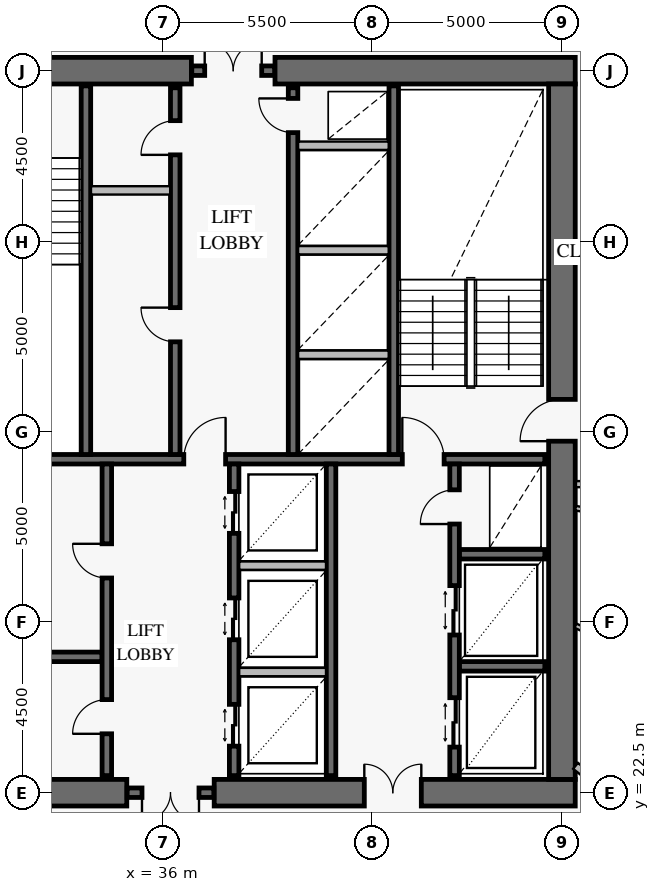
"""IFC4 building model, lengths in metres.
Left out: names, types, materials, properties, quantities, classifications, styles, units other than length and angle.
Written with IfcOpenShell. Run it as: python <this file> out.ifc"""

import sys

from ifc_helpers import new_model, si_unit, direction, frame, frame_2d, origin, place, context, subcontext, project, spatial, rectangle, extrude, element, fill, save


model = new_model("IFC4")
c1 = context("Model", 3, precision=1e-05, world=origin(), true_north=direction((0.0, 1.0)))
c2 = subcontext(c1, "Body", "Model", "MODEL_VIEW")
j1 = project(units=[si_unit("LENGTHUNIT", "METRE"), si_unit("PLANEANGLEUNIT", "RADIAN")], contexts=[c1])
p1 = place(None, origin())
s1 = spatial("IfcSite", under=j1, at=p1, CompositionType="ELEMENT")
p2 = place(p1, origin())
s2 = spatial("IfcBuilding", under=s1, at=p2, CompositionType="ELEMENT")
p3 = place(p2, frame((0.0, 0.0, 173.2)))
s3 = spatial("IfcBuildingStorey", under=s2, at=p3, CompositionType="ELEMENT", Elevation=173.2)
p4 = place(p3, frame((25.15, 22.5, 0.0), z_axis=(0.0, 0.0, 1.0), x_axis=(1.0, 0.0, 0.0)))
e1 = element("IfcWall", 1, at=p4, inside=s3, PredefinedType="SHEAR", context=c2, shape_type="SweptSolid", body=[
    extrude(rectangle(XDim=9.9, YDim=0.7, at=frame_2d((4.95, 0.0))), origin(), (0.0, 0.0, 1.0), 3.8),
])
p5 = place(p4, frame((4.25, 0.0, 0.0)))
e2 = element("IfcOpeningElement", 2, at=p5, cuts=e1, PredefinedType="OPENING", context=c2, shape_type="SweptSolid", body=[
    extrude(rectangle(XDim=1.5, YDim=2.15, at=frame_2d((0.75, 1.075))), frame((0.0, 0.362, 0.0), z_axis=(0.0, -1.0, 0.0), x_axis=(1.0, 0.0, 0.0)), (0.0, 0.0, 1.0), 0.724),
])
p6 = place(p3, frame((37.35, 22.5, 0.0), z_axis=(0.0, 0.0, 1.0), x_axis=(1.0, 0.0, 0.0)))
e3 = element("IfcWall", 3, at=p6, inside=s3, PredefinedType="SHEAR", context=c2, shape_type="SweptSolid", body=[
    extrude(rectangle(XDim=9.5, YDim=0.7, at=frame_2d((4.75, 0.0))), origin(), (0.0, 0.0, 1.0), 3.8),
])
p7 = place(p6, frame((3.95, 0.0, 0.0)))
e4 = element("IfcOpeningElement", 4, at=p7, cuts=e3, PredefinedType="OPENING", context=c2, shape_type="SweptSolid", body=[
    extrude(rectangle(XDim=1.5, YDim=2.15, at=frame_2d((0.75, 1.075))), frame((0.0, 0.362, 0.0), z_axis=(0.0, -1.0, 0.0), x_axis=(1.0, 0.0, 0.0)), (0.0, 0.0, 1.0), 0.724),
])
p8 = place(p3, frame((46.85, 41.5, 0.0), z_axis=(0.0, 0.0, 1.0), x_axis=(-1.0, 0.0, 0.0)))
e5 = element("IfcWall", 5, at=p8, inside=s3, PredefinedType="SHEAR", context=c2, shape_type="SweptSolid", body=[
    extrude(rectangle(XDim=7.9, YDim=0.7, at=frame_2d((3.95, 0.0))), origin(), (0.0, 0.0, 1.0), 3.8),
])
p9 = place(p3, frame((36.75, 41.5, 0.0), z_axis=(0.0, 0.0, 1.0), x_axis=(-1.0, 0.0, 0.0)))
e6 = element("IfcWall", 6, at=p9, inside=s3, PredefinedType="SHEAR", context=c2, shape_type="SweptSolid", body=[
    extrude(rectangle(XDim=11.6, YDim=0.7, at=frame_2d((5.8, 0.0))), origin(), (0.0, 0.0, 1.0), 3.8),
])
p10 = place(p9, frame((4.25, 0.0, 0.0)))
e7 = element("IfcOpeningElement", 7, at=p10, cuts=e6, PredefinedType="OPENING", context=c2, shape_type="SweptSolid", body=[
    extrude(rectangle(XDim=1.1, YDim=2.15, at=frame_2d((0.55, 1.075))), frame((0.0, 0.362, 0.0), z_axis=(0.0, -1.0, 0.0), x_axis=(1.0, 0.0, 0.0)), (0.0, 0.0, 1.0), 0.724),
])
p11 = place(p3, frame((46.5, 22.85, 0.0), z_axis=(0.0, 0.0, 1.0), x_axis=(0.0, 1.0, 0.0)))
e8 = element("IfcWall", 8, at=p11, inside=s3, PredefinedType="SHEAR", context=c2, shape_type="SweptSolid", body=[
    extrude(rectangle(XDim=18.3, YDim=0.7, at=frame_2d((9.15, 0.0))), origin(), (0.0, 0.0, 1.0), 3.8),
])
p12 = place(p11, frame((8.9, 0.0, 0.0)))
e9 = element("IfcOpeningElement", 9, at=p12, cuts=e8, PredefinedType="OPENING", context=c2, shape_type="SweptSolid", body=[
    extrude(rectangle(XDim=1.1, YDim=2.15, at=frame_2d((0.55, 1.075))), frame((0.0, 0.362, 0.0), z_axis=(0.0, -1.0, 0.0), x_axis=(1.0, 0.0, 0.0)), (0.0, 0.0, 1.0), 0.724),
])
p13 = place(p3, frame((35.06, 22.5, 0.0), z_axis=(0.0, 0.0, 1.0), x_axis=(1.0, 0.0, 0.0)))
e10 = element("IfcWall", 10, at=p13, inside=s3, PredefinedType="SOLIDWALL", context=c2, shape_type="SweptSolid", body=[
    extrude(rectangle(XDim=2.28, YDim=0.25, at=frame_2d((1.14, 0.0))), origin(), (0.0, 0.0, 1.0), 3.8),
])
p14 = place(p13, frame((0.39, 0.0, 0.0)))
e11 = element("IfcOpeningElement", 11, at=p14, cuts=e10, PredefinedType="OPENING", context=c2, shape_type="SweptSolid", body=[
    extrude(rectangle(XDim=1.5, YDim=2.15, at=frame_2d((0.75, 1.075))), frame((0.0, 0.137, 0.0), z_axis=(0.0, -1.0, 0.0), x_axis=(1.0, 0.0, 0.0)), (0.0, 0.0, 1.0), 0.274),
])
p15 = place(p3, frame((36.76, 41.5, 0.0), z_axis=(0.0, 0.0, 1.0), x_axis=(1.0, 0.0, 0.0)))
e12 = element("IfcWall", 12, at=p15, inside=s3, PredefinedType="SOLIDWALL", context=c2, shape_type="SweptSolid", body=[
    extrude(rectangle(XDim=2.18, YDim=0.25, at=frame_2d((1.09, 0.0))), origin(), (0.0, 0.0, 1.0), 3.8),
])
p16 = place(p15, frame((0.34, 0.0, 0.0)))
e13 = element("IfcOpeningElement", 13, at=p16, cuts=e12, PredefinedType="OPENING", context=c2, shape_type="SweptSolid", body=[
    extrude(rectangle(XDim=1.5, YDim=2.15, at=frame_2d((0.75, 1.075))), frame((0.0, 0.137, 0.0), z_axis=(0.0, -1.0, 0.0), x_axis=(1.0, 0.0, 0.0)), (0.0, 0.0, 1.0), 0.274),
])
p17 = place(p3, frame((25.95, 31.275, 0.0), z_axis=(0.0, 0.0, 1.0), x_axis=(1.0, 0.0, 0.0)))
e14 = element("IfcWall", 14, at=p17, inside=s3, PredefinedType="SOLIDWALL", context=c2, shape_type="SweptSolid", body=[
    extrude(rectangle(XDim=20.1, YDim=0.25, at=frame_2d((10.05, 0.0))), origin(), (0.0, 0.0, 1.0), 3.8),
])
p18 = place(p17, frame((2.6, 0.0, 0.0)))
e15 = element("IfcOpeningElement", 15, at=p18, cuts=e14, PredefinedType="OPENING", context=c2, shape_type="SweptSolid", body=[
    extrude(rectangle(XDim=1.1, YDim=2.15, at=frame_2d((0.55, 1.075))), frame((0.0, 0.137, 0.0), z_axis=(0.0, -1.0, 0.0), x_axis=(1.0, 0.0, 0.0)), (0.0, 0.0, 1.0), 0.274),
])
p19 = place(p17, frame((10.6, 0.0, 0.0)))
e16 = element("IfcOpeningElement", 16, at=p19, cuts=e14, PredefinedType="OPENING", context=c2, shape_type="SweptSolid", body=[
    extrude(rectangle(XDim=1.1, YDim=2.15, at=frame_2d((0.55, 1.075))), frame((0.0, 0.137, 0.0), z_axis=(0.0, -1.0, 0.0), x_axis=(1.0, 0.0, 0.0)), (0.0, 0.0, 1.0), 0.274),
])
p20 = place(p17, frame((16.35, 0.0, 0.0)))
e17 = element("IfcOpeningElement", 17, at=p20, cuts=e14, PredefinedType="OPENING", context=c2, shape_type="SweptSolid", body=[
    extrude(rectangle(XDim=1.1, YDim=2.15, at=frame_2d((0.55, 1.075))), frame((0.0, 0.137, 0.0), z_axis=(0.0, -1.0, 0.0), x_axis=(1.0, 0.0, 0.0)), (0.0, 0.0, 1.0), 0.274),
])
for number, where, z_axis, x_axis in (
    (18, (33.975, 31.4, 0.0), (0.0, 0.0, 1.0), (0.0, 1.0, 0.0)),
    (19, (42.075, 31.4, 0.0), (0.0, 0.0, 1.0), (0.0, 1.0, 0.0)),
):
    element("IfcWall", number, at=place(p3, frame(where, z_axis=z_axis, x_axis=x_axis)), inside=s3, PredefinedType="SOLIDWALL", context=c2, shape_type="SweptSolid", body=[
        extrude(rectangle(XDim=9.7, YDim=0.25, at=frame_2d((4.85, 0.0))), origin(), (0.0, 0.0, 1.0), 3.8),
    ])
p21 = place(p3, frame((36.325, 31.4, 0.0), z_axis=(0.0, 0.0, 1.0), x_axis=(0.0, 1.0, 0.0)))
e20 = element("IfcWall", 20, at=p21, inside=s3, PredefinedType="SOLIDWALL", context=c2, shape_type="SweptSolid", body=[
    extrude(rectangle(XDim=9.65, YDim=0.25, at=frame_2d((4.825, 0.0))), origin(), (0.0, 0.0, 1.0), 3.8),
])
p22 = place(p21, frame((2.965, 0.0, 0.0)))
e21 = element("IfcOpeningElement", 21, at=p22, cuts=e20, PredefinedType="OPENING", context=c2, shape_type="SweptSolid", body=[
    extrude(rectangle(XDim=0.9, YDim=2.1, at=frame_2d((0.45, 1.05))), frame((0.0, 0.137, 0.0), z_axis=(0.0, -1.0, 0.0), x_axis=(1.0, 0.0, 0.0)), (0.0, 0.0, 1.0), 0.274),
])
p23 = place(p21, frame((7.885, 0.0, 0.0)))
e22 = element("IfcOpeningElement", 22, at=p23, cuts=e20, PredefinedType="OPENING", context=c2, shape_type="SweptSolid", body=[
    extrude(rectangle(XDim=0.9, YDim=2.1, at=frame_2d((0.45, 1.05))), frame((0.0, 0.137, 0.0), z_axis=(0.0, -1.0, 0.0), x_axis=(1.0, 0.0, 0.0)), (0.0, 0.0, 1.0), 0.274),
])
p24 = place(p3, frame((39.425, 31.4, 0.0), z_axis=(0.0, 0.0, 1.0), x_axis=(0.0, 1.0, 0.0)))
e23 = element("IfcWall", 23, at=p24, inside=s3, PredefinedType="SOLIDWALL", context=c2, shape_type="SweptSolid", body=[
    extrude(rectangle(XDim=9.65, YDim=0.25, at=frame_2d((4.825, 0.0))), origin(), (0.0, 0.0, 1.0), 3.8),
])
p25 = place(p24, frame((8.47, 0.0, 0.0)))
e24 = element("IfcOpeningElement", 24, at=p25, cuts=e23, PredefinedType="OPENING", context=c2, shape_type="SweptSolid", body=[
    extrude(rectangle(XDim=0.9, YDim=2.1, at=frame_2d((0.45, 1.05))), frame((0.0, 0.137, 0.0), z_axis=(0.0, -1.0, 0.0), x_axis=(1.0, 0.0, 0.0)), (0.0, 0.0, 1.0), 0.274),
])
p26 = place(p3, frame((32.1, 26.075, 0.0), z_axis=(0.0, 0.0, 1.0), x_axis=(1.0, 0.0, 0.0)))
e25 = element("IfcWall", 25, at=p26, inside=s3, PredefinedType="SOLIDWALL", context=c2, shape_type="SweptSolid", body=[
    extrude(rectangle(XDim=2.3, YDim=0.25, at=frame_2d((1.15, 0.0))), origin(), (0.0, 0.0, 1.0), 3.8),
])
p27 = place(p3, frame((34.525, 22.95, 0.0), z_axis=(0.0, 0.0, 1.0), x_axis=(0.0, 1.0, 0.0)))
e26 = element("IfcWall", 26, at=p27, inside=s3, PredefinedType="SOLIDWALL", context=c2, shape_type="SweptSolid", body=[
    extrude(rectangle(XDim=8.2, YDim=0.25, at=frame_2d((4.1, 0.0))), origin(), (0.0, 0.0, 1.0), 3.8),
])
p28 = place(p27, frame((1.1, 0.0, 0.0)))
e27 = element("IfcOpeningElement", 27, at=p28, cuts=e26, PredefinedType="OPENING", context=c2, shape_type="SweptSolid", body=[
    extrude(rectangle(XDim=0.9, YDim=2.1, at=frame_2d((0.45, 1.05))), frame((0.0, 0.137, 0.0), z_axis=(0.0, -1.0, 0.0), x_axis=(1.0, 0.0, 0.0)), (0.0, 0.0, 1.0), 0.274),
])
p29 = place(p27, frame((5.2, 0.0, 0.0)))
e28 = element("IfcOpeningElement", 28, at=p29, cuts=e26, PredefinedType="OPENING", context=c2, shape_type="SweptSolid", body=[
    extrude(rectangle(XDim=0.9, YDim=2.1, at=frame_2d((0.45, 1.05))), frame((0.0, 0.137, 0.0), z_axis=(0.0, -1.0, 0.0), x_axis=(1.0, 0.0, 0.0)), (0.0, 0.0, 1.0), 0.274),
])
p30 = place(p3, frame((37.875, 22.95, 0.0), z_axis=(0.0, 0.0, 1.0), x_axis=(0.0, 1.0, 0.0)))
e29 = element("IfcWall", 29, at=p30, inside=s3, PredefinedType="SOLIDWALL", context=c2, shape_type="SweptSolid", body=[
    extrude(rectangle(XDim=8.2, YDim=0.25, at=frame_2d((4.1, 0.0))), origin(), (0.0, 0.0, 1.0), 3.8),
])
p31 = place(p30, frame((0.775, 0.0, 0.0)))
e30 = element("IfcOpeningElement", 30, at=p31, cuts=e29, PredefinedType="OPENING", context=c2, shape_type="SweptSolid", body=[
    extrude(rectangle(XDim=1.1, YDim=2.2, at=frame_2d((0.55, 1.1))), frame((0.0, 0.137, 0.0), z_axis=(0.0, -1.0, 0.0), x_axis=(1.0, 0.0, 0.0)), (0.0, 0.0, 1.0), 0.274),
])
p32 = place(p30, frame((3.575, 0.0, 0.0)))
e31 = element("IfcOpeningElement", 31, at=p32, cuts=e29, PredefinedType="OPENING", context=c2, shape_type="SweptSolid", body=[
    extrude(rectangle(XDim=1.1, YDim=2.2, at=frame_2d((0.55, 1.1))), frame((0.0, 0.137, 0.0), z_axis=(0.0, -1.0, 0.0), x_axis=(1.0, 0.0, 0.0)), (0.0, 0.0, 1.0), 0.274),
])
p33 = place(p30, frame((6.375, 0.0, 0.0)))
e32 = element("IfcOpeningElement", 32, at=p33, cuts=e29, PredefinedType="OPENING", context=c2, shape_type="SweptSolid", body=[
    extrude(rectangle(XDim=1.1, YDim=2.2, at=frame_2d((0.55, 1.1))), frame((0.0, 0.137, 0.0), z_axis=(0.0, -1.0, 0.0), x_axis=(1.0, 0.0, 0.0)), (0.0, 0.0, 1.0), 0.274),
])
p34 = place(p3, frame((40.425, 22.95, 0.0), z_axis=(0.0, 0.0, 1.0), x_axis=(0.0, 1.0, 0.0)))
e33 = element("IfcWall", 33, at=p34, inside=s3, PredefinedType="SOLIDWALL", context=c2, shape_type="SweptSolid", body=[
    extrude(rectangle(XDim=8.2, YDim=0.25, at=frame_2d((4.1, 0.0))), origin(), (0.0, 0.0, 1.0), 3.8),
])
for number, where, z_axis, x_axis in (
    (34, (43.8, 25.825, 0.0), (0.0, 0.0, 1.0), (1.0, 0.0, 0.0)),
    (35, (43.8, 28.775, 0.0), (0.0, 0.0, 1.0), (1.0, 0.0, 0.0)),
):
    element("IfcWall", number, at=place(p3, frame(where, z_axis=z_axis, x_axis=x_axis)), inside=s3, PredefinedType="SOLIDWALL", context=c2, shape_type="SweptSolid", body=[
        extrude(rectangle(XDim=2.25, YDim=0.25, at=frame_2d((1.125, 0.0))), origin(), (0.0, 0.0, 1.0), 3.8),
    ])
p35 = place(p3, frame((43.675, 22.95, 0.0), z_axis=(0.0, 0.0, 1.0), x_axis=(0.0, 1.0, 0.0)))
e36 = element("IfcWall", 36, at=p35, inside=s3, PredefinedType="SOLIDWALL", context=c2, shape_type="SweptSolid", body=[
    extrude(rectangle(XDim=8.2, YDim=0.25, at=frame_2d((4.1, 0.0))), origin(), (0.0, 0.0, 1.0), 3.8),
])
p36 = place(p35, frame((0.75, 0.0, 0.0)))
e37 = element("IfcOpeningElement", 37, at=p36, cuts=e36, PredefinedType="OPENING", context=c2, shape_type="SweptSolid", body=[
    extrude(rectangle(XDim=1.3, YDim=2.3, at=frame_2d((0.65, 1.15))), frame((0.0, 0.137, 0.0), z_axis=(0.0, -1.0, 0.0), x_axis=(1.0, 0.0, 0.0)), (0.0, 0.0, 1.0), 0.274),
])
p37 = place(p35, frame((3.7, 0.0, 0.0)))
e38 = element("IfcOpeningElement", 38, at=p37, cuts=e36, PredefinedType="OPENING", context=c2, shape_type="SweptSolid", body=[
    extrude(rectangle(XDim=1.3, YDim=2.3, at=frame_2d((0.65, 1.15))), frame((0.0, 0.137, 0.0), z_axis=(0.0, -1.0, 0.0), x_axis=(1.0, 0.0, 0.0)), (0.0, 0.0, 1.0), 0.274),
])
p38 = place(p35, frame((6.62, 0.0, 0.0)))
e39 = element("IfcOpeningElement", 39, at=p38, cuts=e36, PredefinedType="OPENING", context=c2, shape_type="SweptSolid", body=[
    extrude(rectangle(XDim=0.9, YDim=2.1, at=frame_2d((0.45, 1.05))), frame((0.0, 0.137, 0.0), z_axis=(0.0, -1.0, 0.0), x_axis=(1.0, 0.0, 0.0)), (0.0, 0.0, 1.0), 0.274),
])
p39 = place(p3, frame((34.108, 38.35, 0.0), z_axis=(0.0, 0.0, 1.0), x_axis=(1.0, 0.0, 0.0)))
e40 = element("IfcWall", 40, at=p39, inside=s3, PredefinedType="PARTITIONING", context=c2, shape_type="SweptSolid", body=[
    extrude(rectangle(XDim=2.084, YDim=0.22, at=frame_2d((1.042, 0.0))), origin(), (0.0, 0.0, 1.0), 3.55),
])
for number, where, z_axis, x_axis in (
    (41, (39.558, 34.025, 0.0), (0.0, 0.0, 1.0), (1.0, 0.0, 0.0)),
    (42, (39.558, 36.775, 0.0), (0.0, 0.0, 1.0), (1.0, 0.0, 0.0)),
    (43, (39.558, 39.525, 0.0), (0.0, 0.0, 1.0), (1.0, 0.0, 0.0)),
):
    element("IfcWall", number, at=place(p3, frame(where, z_axis=z_axis, x_axis=x_axis)), inside=s3, PredefinedType="PARTITIONING", context=c2, shape_type="SweptSolid", body=[
        extrude(rectangle(XDim=2.384, YDim=0.22, at=frame_2d((1.192, 0.0))), origin(), (0.0, 0.0, 1.0), 3.55),
    ])
for number, where, z_axis, x_axis in (
    (44, (38.008, 25.675, 0.0), (0.0, 0.0, 1.0), (1.0, 0.0, 0.0)),
    (45, (38.008, 28.475, 0.0), (0.0, 0.0, 1.0), (1.0, 0.0, 0.0)),
):
    element("IfcWall", number, at=place(p3, frame(where, z_axis=z_axis, x_axis=x_axis)), inside=s3, PredefinedType="PARTITIONING", context=c2, shape_type="SweptSolid", body=[
        extrude(rectangle(XDim=2.284, YDim=0.22, at=frame_2d((1.142, 0.0))), origin(), (0.0, 0.0, 1.0), 3.55),
    ])
p40 = place(p3, frame((46.858, 23.207, 0.0), z_axis=(0.0, 0.0, 1.0), x_axis=(0.777244870707, -0.629198228668, 0.0)))
e46 = element("IfcWall", 46, at=p40, inside=s3, PredefinedType="PARTITIONING", context=c2, shape_type="SweptSolid", body=[
    extrude(rectangle(XDim=1.458, YDim=0.2, at=frame_2d((0.729, 0.0))), origin(), (0.0, 0.0, 1.0), 3.55),
])
p41 = place(p3, frame((46.858, 29.988, 0.0), z_axis=(0.0, 0.0, 1.0), x_axis=(0.983273284931, -0.182136342173, 0.0)))
e47 = element("IfcWall", 47, at=p41, inside=s3, PredefinedType="PARTITIONING", context=c2, shape_type="SweptSolid", body=[
    extrude(rectangle(XDim=3.528, YDim=0.12, at=frame_2d((1.764, 0.0))), origin(), (0.0, 0.0, 1.0), 3.55),
])
p42 = place(p3, frame((46.858, 26.895, 0.0), z_axis=(0.0, 0.0, 1.0), x_axis=(0.904965101131, -0.425485799686, 0.0)))
e48 = element("IfcWall", 48, at=p42, inside=s3, PredefinedType="PARTITIONING", context=c2, shape_type="SweptSolid", body=[
    extrude(rectangle(XDim=2.871, YDim=0.12, at=frame_2d((1.436, 0.0))), origin(), (0.0, 0.0, 1.0), 3.55),
])
p43 = place(p3, frame((46.87, 30.62, 0.0), z_axis=(0.0, 0.0, 1.0), x_axis=(1.0, 0.0, 0.0)))
e49 = element("IfcWall", 49, at=p43, inside=s3, PredefinedType="PARTITIONING", context=c2, shape_type="SweptSolid", body=[
    extrude(rectangle(XDim=2.03, YDim=0.16, at=frame_2d((1.015, 0.0))), origin(), (0.0, 0.0, 1.0), 3.55),
])
p44 = place(p12, origin())
e50 = element("IfcDoor", 50, at=p44, inside=s3, OperationType="SINGLE_SWING_LEFT", PredefinedType="USERDEFINED", context=c2, shape_type="SweptSolid", body=[
    extrude(rectangle(XDim=1.1, YDim=2.15, at=frame_2d((0.55, 1.075))), frame((0.0, 0.025, 0.0), z_axis=(0.0, -1.0, 0.0), x_axis=(1.0, 0.0, 0.0)), (0.0, 0.0, 1.0), 0.05),
])
fill(e9, e50)
p45 = place(p7, origin())
e51 = element("IfcDoor", 51, at=p45, inside=s3, OperationType="DOUBLE_DOOR_SINGLE_SWING", PredefinedType="DOOR", context=c2, shape_type="SweptSolid", body=[
    extrude(rectangle(XDim=1.5, YDim=2.15, at=frame_2d((0.75, 1.075))), frame((0.0, 0.025, 0.0), z_axis=(0.0, -1.0, 0.0), x_axis=(1.0, 0.0, 0.0)), (0.0, 0.0, 1.0), 0.05),
])
fill(e4, e51)
p46 = place(p14, frame((1.5, 0.0, 0.0), z_axis=(0.0, 0.0, 1.0), x_axis=(-1.0, 0.0, 0.0)))
e52 = element("IfcDoor", 52, at=p46, inside=s3, OperationType="DOUBLE_DOOR_SINGLE_SWING", PredefinedType="DOOR", context=c2, shape_type="SweptSolid", body=[
    extrude(rectangle(XDim=1.5, YDim=2.15, at=frame_2d((0.75, 1.075))), frame((0.0, 0.025, 0.0), z_axis=(0.0, -1.0, 0.0), x_axis=(1.0, 0.0, 0.0)), (0.0, 0.0, 1.0), 0.05),
])
fill(e11, e52)
p47 = place(p16, origin())
e53 = element("IfcDoor", 53, at=p47, inside=s3, OperationType="DOUBLE_DOOR_SINGLE_SWING", PredefinedType="DOOR", context=c2, shape_type="SweptSolid", body=[
    extrude(rectangle(XDim=1.5, YDim=2.15, at=frame_2d((0.75, 1.075))), frame((0.0, 0.025, 0.0), z_axis=(0.0, -1.0, 0.0), x_axis=(1.0, 0.0, 0.0)), (0.0, 0.0, 1.0), 0.05),
])
fill(e13, e53)
p48 = place(p19, origin())
e54 = element("IfcDoor", 54, at=p48, inside=s3, OperationType="SINGLE_SWING_RIGHT", PredefinedType="USERDEFINED", context=c2, shape_type="SweptSolid", body=[
    extrude(rectangle(XDim=1.1, YDim=2.15, at=frame_2d((0.55, 1.075))), frame((0.0, 0.025, 0.0), z_axis=(0.0, -1.0, 0.0), x_axis=(1.0, 0.0, 0.0)), (0.0, 0.0, 1.0), 0.05),
])
fill(e16, e54)
p49 = place(p20, origin())
e55 = element("IfcDoor", 55, at=p49, inside=s3, OperationType="SINGLE_SWING_LEFT", PredefinedType="USERDEFINED", context=c2, shape_type="SweptSolid", body=[
    extrude(rectangle(XDim=1.1, YDim=2.15, at=frame_2d((0.55, 1.075))), frame((0.0, 0.025, 0.0), z_axis=(0.0, -1.0, 0.0), x_axis=(1.0, 0.0, 0.0)), (0.0, 0.0, 1.0), 0.05),
])
fill(e17, e55)
p50 = place(p22, origin())
e56 = element("IfcDoor", 56, at=p50, inside=s3, OperationType="SINGLE_SWING_RIGHT", PredefinedType="DOOR", context=c2, shape_type="SweptSolid", body=[
    extrude(rectangle(XDim=0.9, YDim=2.1, at=frame_2d((0.45, 1.05))), frame((0.0, 0.025, 0.0), z_axis=(0.0, -1.0, 0.0), x_axis=(1.0, 0.0, 0.0)), (0.0, 0.0, 1.0), 0.05),
])
fill(e21, e56)
p51 = place(p23, origin())
e57 = element("IfcDoor", 57, at=p51, inside=s3, OperationType="SINGLE_SWING_LEFT", PredefinedType="DOOR", context=c2, shape_type="SweptSolid", body=[
    extrude(rectangle(XDim=0.9, YDim=2.1, at=frame_2d((0.45, 1.05))), frame((0.0, 0.025, 0.0), z_axis=(0.0, -1.0, 0.0), x_axis=(1.0, 0.0, 0.0)), (0.0, 0.0, 1.0), 0.05),
])
fill(e22, e57)
p52 = place(p25, origin())
e58 = element("IfcDoor", 58, at=p52, inside=s3, OperationType="SINGLE_SWING_RIGHT", PredefinedType="DOOR", context=c2, shape_type="SweptSolid", body=[
    extrude(rectangle(XDim=0.9, YDim=2.1, at=frame_2d((0.45, 1.05))), frame((0.0, 0.025, 0.0), z_axis=(0.0, -1.0, 0.0), x_axis=(1.0, 0.0, 0.0)), (0.0, 0.0, 1.0), 0.05),
])
fill(e24, e58)
p53 = place(p28, origin())
e59 = element("IfcDoor", 59, at=p53, inside=s3, OperationType="SINGLE_SWING_LEFT", PredefinedType="DOOR", context=c2, shape_type="SweptSolid", body=[
    extrude(rectangle(XDim=0.9, YDim=2.1, at=frame_2d((0.45, 1.05))), frame((0.0, 0.025, 0.0), z_axis=(0.0, -1.0, 0.0), x_axis=(1.0, 0.0, 0.0)), (0.0, 0.0, 1.0), 0.05),
])
fill(e27, e59)
p54 = place(p29, origin())
e60 = element("IfcDoor", 60, at=p54, inside=s3, OperationType="SINGLE_SWING_RIGHT", PredefinedType="DOOR", context=c2, shape_type="SweptSolid", body=[
    extrude(rectangle(XDim=0.9, YDim=2.1, at=frame_2d((0.45, 1.05))), frame((0.0, 0.025, 0.0), z_axis=(0.0, -1.0, 0.0), x_axis=(1.0, 0.0, 0.0)), (0.0, 0.0, 1.0), 0.05),
])
fill(e28, e60)
p55 = place(p31, origin())
e61 = element("IfcDoor", 61, at=p55, inside=s3, OperationType="DOUBLE_DOOR_SLIDING", PredefinedType="DOOR", context=c2, shape_type="SweptSolid", body=[
    extrude(rectangle(XDim=1.1, YDim=2.2, at=frame_2d((0.55, 1.1))), frame((0.0, 0.025, 0.0), z_axis=(0.0, -1.0, 0.0), x_axis=(1.0, 0.0, 0.0)), (0.0, 0.0, 1.0), 0.05),
])
fill(e30, e61)
p56 = place(p32, origin())
e62 = element("IfcDoor", 62, at=p56, inside=s3, OperationType="DOUBLE_DOOR_SLIDING", PredefinedType="DOOR", context=c2, shape_type="SweptSolid", body=[
    extrude(rectangle(XDim=1.1, YDim=2.2, at=frame_2d((0.55, 1.1))), frame((0.0, 0.025, 0.0), z_axis=(0.0, -1.0, 0.0), x_axis=(1.0, 0.0, 0.0)), (0.0, 0.0, 1.0), 0.05),
])
fill(e31, e62)
p57 = place(p33, origin())
e63 = element("IfcDoor", 63, at=p57, inside=s3, OperationType="DOUBLE_DOOR_SLIDING", PredefinedType="DOOR", context=c2, shape_type="SweptSolid", body=[
    extrude(rectangle(XDim=1.1, YDim=2.2, at=frame_2d((0.55, 1.1))), frame((0.0, 0.025, 0.0), z_axis=(0.0, -1.0, 0.0), x_axis=(1.0, 0.0, 0.0)), (0.0, 0.0, 1.0), 0.05),
])
fill(e32, e63)
p58 = place(p36, origin())
e64 = element("IfcDoor", 64, at=p58, inside=s3, OperationType="DOUBLE_DOOR_SLIDING", PredefinedType="DOOR", context=c2, shape_type="SweptSolid", body=[
    extrude(rectangle(XDim=1.3, YDim=2.3, at=frame_2d((0.65, 1.15))), frame((0.0, 0.025, 0.0), z_axis=(0.0, -1.0, 0.0), x_axis=(1.0, 0.0, 0.0)), (0.0, 0.0, 1.0), 0.05),
])
fill(e37, e64)
p59 = place(p37, origin())
e65 = element("IfcDoor", 65, at=p59, inside=s3, OperationType="DOUBLE_DOOR_SLIDING", PredefinedType="DOOR", context=c2, shape_type="SweptSolid", body=[
    extrude(rectangle(XDim=1.3, YDim=2.3, at=frame_2d((0.65, 1.15))), frame((0.0, 0.025, 0.0), z_axis=(0.0, -1.0, 0.0), x_axis=(1.0, 0.0, 0.0)), (0.0, 0.0, 1.0), 0.05),
])
fill(e38, e65)
p60 = place(p38, origin())
e66 = element("IfcDoor", 66, at=p60, inside=s3, OperationType="SINGLE_SWING_LEFT", PredefinedType="DOOR", context=c2, shape_type="SweptSolid", body=[
    extrude(rectangle(XDim=0.9, YDim=2.1, at=frame_2d((0.45, 1.05))), frame((0.0, 0.025, 0.0), z_axis=(0.0, -1.0, 0.0), x_axis=(1.0, 0.0, 0.0)), (0.0, 0.0, 1.0), 0.05),
])
fill(e39, e66)
save(model, sys.argv[1])
